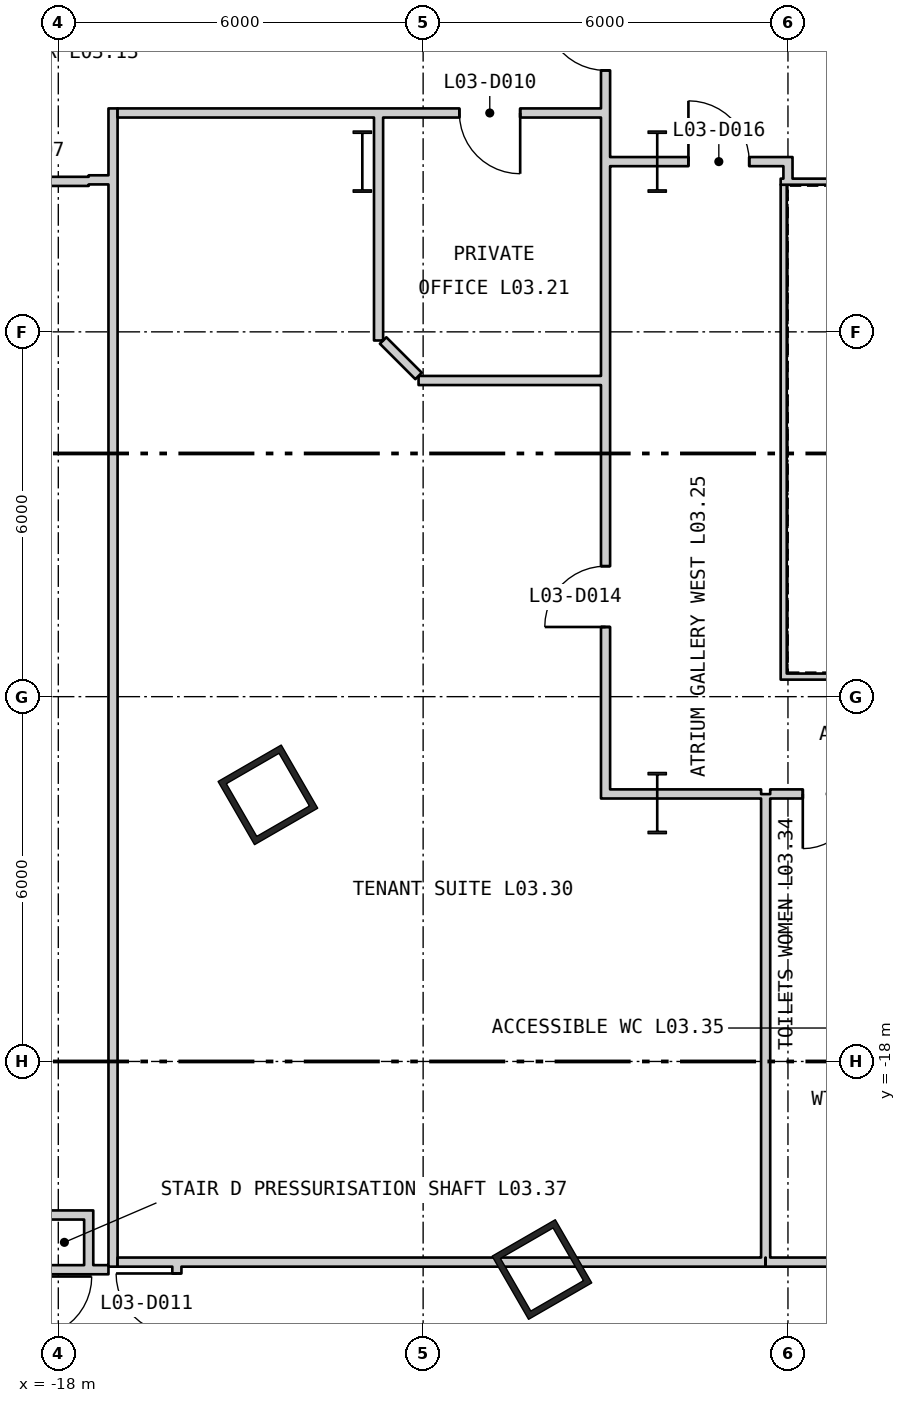
"""IFC4 building model, lengths in metres.
Left out: names, types, materials, properties, quantities, classifications, styles, units other than length and angle.
Written with IfcOpenShell. Run it as: python <this file> out.ifc"""

import sys

from ifc_helpers import new_model, si_unit, direction, frame, frame_2d, origin, origin_2d, place, context, subcontext, project, spatial, rectangle, hollow_rectangle, i_section, extrude, element, fill, save


model = new_model("IFC4")
c1 = context("Model", 3, precision=1e-05, world=origin(), true_north=direction((0.0, 1.0)))
c2 = subcontext(c1, "Body", "Model", "MODEL_VIEW")
j1 = project(units=[si_unit("LENGTHUNIT", "METRE"), si_unit("PLANEANGLEUNIT", "RADIAN")], contexts=[c1])
p1 = place(None, origin())
s1 = spatial("IfcSite", under=j1, at=p1, CompositionType="ELEMENT")
p2 = place(p1, origin())
s2 = spatial("IfcBuilding", under=s1, at=p2, CompositionType="ELEMENT")
p3 = place(p2, frame((0.0, 0.0, 18.6)))
s3 = spatial("IfcBuildingStorey", under=s2, at=p3, CompositionType="ELEMENT", Elevation=18.6)
for number, where, z_axis, x_axis in (
    (1, (-14.553, -13.615, 0.0), (0.0, 0.0, 1.0), (0.5, -0.866, 0.0)),
    (2, (-10.046, -21.422, 0.0), (0.0, 0.0, 1.0), (0.5, -0.866, 0.0)),
):
    element("IfcColumn", number, at=place(p3, frame(where, z_axis=z_axis, x_axis=x_axis)), inside=s3, PredefinedType="COLUMN", context=c2, shape_type="SweptSolid", body=[
        extrude(hollow_rectangle(XDim=1.2, YDim=1.2, WallThickness=0.1, at=origin_2d()), origin(), (0.0, 0.0, 1.0), 5.1),
    ])
for number, where, z_axis, x_axis in (
    (3, (-8.15, -3.2, 0.0), (0.0, 0.0, 1.0), (1.0, 0.0, 0.0)),
    (4, (-8.15, -13.75, 0.0), (0.0, 0.0, 1.0), (1.0, 0.0, 0.0)),
    (5, (-13.0, -3.2, 0.0), (0.0, 0.0, 1.0), (1.0, 0.0, 0.0)),
):
    element("IfcColumn", number, at=place(p3, frame(where, z_axis=z_axis, x_axis=x_axis)), inside=s3, PredefinedType="COLUMN", context=c2, shape_type="SweptSolid", body=[
        extrude(i_section(OverallWidth=0.302, OverallDepth=1.008, WebThickness=0.021, FlangeThickness=0.04, at=origin_2d()), origin(), (0.0, 0.0, 1.0), 5.1),
    ])
for number, where, z_axis, x_axis in (
    (6, (-6.12, -11.67, 0.0), (0.0, 0.0, 1.0), (1.0, 0.0, 0.0)),
    (7, (6.12, -3.53, 0.0), (0.0, 0.0, 1.0), (-1.0, 0.0, 0.0)),
):
    element("IfcWall", number, at=place(p3, frame(where, z_axis=z_axis, x_axis=x_axis)), inside=s3, PredefinedType="PARTITIONING", context=c2, shape_type="SweptSolid", body=[
        extrude(rectangle(XDim=12.24, YDim=0.1, at=frame_2d((6.12, 0.0))), origin(), (0.0, 0.0, 1.0), 4.88),
    ])
p4 = place(p3, frame((-6.07, -3.58, 0.0), z_axis=(0.0, 0.0, 1.0), x_axis=(0.0, -1.0, 0.0)))
e8 = element("IfcWall", 8, at=p4, inside=s3, PredefinedType="PARTITIONING", context=c2, shape_type="SweptSolid", body=[
    extrude(rectangle(XDim=8.04, YDim=0.1, at=frame_2d((4.02, 0.0))), origin(), (0.0, 0.0, 1.0), 4.88),
])
p5 = place(p3, frame((-19.825, -3.525, 0.0), z_axis=(0.0, 0.0, 1.0), x_axis=(1.0, 0.0, 0.0)))
e9 = element("IfcWall", 9, at=p5, inside=s3, PredefinedType="PARTITIONING", context=c2, shape_type="SweptSolid", body=[
    extrude(rectangle(XDim=2.325, YDim=0.15, at=frame_2d((1.163, 0.0))), origin(), (0.0, 0.0, 1.0), 4.88),
])
p6 = place(p5, frame((0.662, 0.0, 0.0)))
e10 = element("IfcOpeningElement", 10, at=p6, cuts=e9, PredefinedType="OPENING", context=c2, shape_type="SweptSolid", body=[
    extrude(rectangle(XDim=1.0, YDim=2.1, at=frame_2d((0.5, 1.05))), frame((0.0, 0.085, 0.0), z_axis=(0.0, -1.0, 0.0), x_axis=(1.0, 0.0, 0.0)), (0.0, 0.0, 1.0), 0.17),
])
for number, where, z_axis, x_axis in (
    (11, (-18.225, -21.425, 0.0), (0.0, 0.0, 1.0), (1.0, 0.0, 0.0)),
    (12, (-18.225, -20.525, 0.0), (0.0, 0.0, 1.0), (1.0, 0.0, 0.0)),
):
    element("IfcWall", number, at=place(p3, frame(where, z_axis=z_axis, x_axis=x_axis)), inside=s3, PredefinedType="PARTITIONING", context=c2, shape_type="SweptSolid", body=[
        extrude(rectangle(XDim=0.65, YDim=0.15, at=frame_2d((0.325, 0.0))), origin(), (0.0, 0.0, 1.0), 4.88),
    ])
p7 = place(p3, frame((-17.5, -21.5, 0.0), z_axis=(0.0, 0.0, 1.0), x_axis=(0.0, 1.0, 0.0)))
e13 = element("IfcWall", 13, at=p7, inside=s3, PredefinedType="PARTITIONING", context=c2, shape_type="SweptSolid", body=[
    extrude(rectangle(XDim=1.05, YDim=0.15, at=frame_2d((0.525, 0.0))), origin(), (0.0, 0.0, 1.0), 4.88),
])
p8 = place(p3, frame((-17.5, -3.5, 0.0), z_axis=(0.0, 0.0, 1.0), x_axis=(1.0, 0.0, 0.0)))
e14 = element("IfcWall", 14, at=p8, inside=s3, PredefinedType="PARTITIONING", context=c2, shape_type="SweptSolid", body=[
    extrude(rectangle(XDim=0.325, YDim=0.15, at=frame_2d((0.163, 0.0))), origin(), (0.0, 0.0, 1.0), 4.88),
])
p9 = place(p3, frame((-17.425, -21.425, 0.0), z_axis=(0.0, 0.0, 1.0), x_axis=(1.0, 0.0, 0.0)))
e15 = element("IfcWall", 15, at=p9, inside=s3, PredefinedType="PARTITIONING", context=c2, shape_type="SweptSolid", body=[
    extrude(rectangle(XDim=0.25, YDim=0.15, at=frame_2d((0.125, 0.0))), origin(), (0.0, 0.0, 1.0), 4.88),
])
p10 = place(p3, frame((-17.1, -21.375, 0.0), z_axis=(0.0, 0.0, 1.0), x_axis=(0.0, 1.0, 0.0)))
e16 = element("IfcWall", 16, at=p10, inside=s3, PredefinedType="PARTITIONING", context=c2, shape_type="SweptSolid", body=[
    extrude(rectangle(XDim=19.05, YDim=0.15, at=frame_2d((9.525, 0.0))), origin(), (0.0, 0.0, 1.0), 4.88),
])
p11 = place(p3, frame((-17.025, -21.3, 0.0), z_axis=(0.0, 0.0, 1.0), x_axis=(1.0, 0.0, 0.0)))
e17 = element("IfcWall", 17, at=p11, inside=s3, PredefinedType="PARTITIONING", context=c2, shape_type="SweptSolid", body=[
    extrude(rectangle(XDim=10.655, YDim=0.15, at=frame_2d((5.327, 0.0))), origin(), (0.0, 0.0, 1.0), 4.88),
])
p12 = place(p3, frame((-17.025, -2.4, 0.0), z_axis=(0.0, 0.0, 1.0), x_axis=(1.0, 0.0, 0.0)))
e18 = element("IfcWall", 18, at=p12, inside=s3, PredefinedType="PARTITIONING", context=c2, shape_type="SweptSolid", body=[
    extrude(rectangle(XDim=7.95, YDim=0.15, at=frame_2d((3.975, 0.0))), origin(), (0.0, 0.0, 1.0), 4.88),
])
p13 = place(p12, frame((5.621, 0.0, 0.0)))
e19 = element("IfcOpeningElement", 19, at=p13, cuts=e18, PredefinedType="OPENING", context=c2, shape_type="SweptSolid", body=[
    extrude(rectangle(XDim=1.0, YDim=2.1, at=frame_2d((0.5, 1.05))), frame((0.0, 0.085, 0.0), z_axis=(0.0, -1.0, 0.0), x_axis=(1.0, 0.0, 0.0)), (0.0, 0.0, 1.0), 0.17),
])
p14 = place(p3, frame((-16.05, -23.55, 0.0), z_axis=(0.0, 0.0, 1.0), x_axis=(0.0, 1.0, 0.0)))
e20 = element("IfcWall", 20, at=p14, inside=s3, PredefinedType="PARTITIONING", context=c2, shape_type="SweptSolid", body=[
    extrude(rectangle(XDim=2.175, YDim=0.15, at=frame_2d((1.087, 0.0))), origin(), (0.0, 0.0, 1.0), 4.88),
])
p15 = place(p14, frame((1.063, 0.0, 0.0)))
e21 = element("IfcOpeningElement", 21, at=p15, cuts=e20, PredefinedType="OPENING", context=c2, shape_type="SweptSolid", body=[
    extrude(rectangle(XDim=1.0, YDim=2.1, at=frame_2d((0.5, 1.05))), frame((0.0, 0.085, 0.0), z_axis=(0.0, -1.0, 0.0), x_axis=(1.0, 0.0, 0.0)), (0.0, 0.0, 1.0), 0.17),
])
p16 = place(p3, frame((-12.733, -6.142, 0.0), z_axis=(0.0, 0.0, 1.0), x_axis=(0.0, 1.0, 0.0)))
e22 = element("IfcWall", 22, at=p16, inside=s3, PredefinedType="PARTITIONING", context=c2, shape_type="SweptSolid", body=[
    extrude(rectangle(XDim=3.042, YDim=0.15, at=frame_2d((1.521, 0.0))), origin(), (0.0, 0.0, 1.0), 4.19),
])
p17 = place(p3, frame((-12.733, -3.1, 0.0), z_axis=(0.0, 0.0, 1.0), x_axis=(0.0, 1.0, 0.0)))
e23 = element("IfcWall", 23, at=p17, inside=s3, PredefinedType="PARTITIONING", context=c2, shape_type="SweptSolid", body=[
    extrude(rectangle(XDim=0.625, YDim=0.15, at=frame_2d((0.312, 0.0))), origin(), (0.0, 0.0, 1.0), 4.28),
])
p18 = place(p3, frame((-12.658, -6.142, 0.0), z_axis=(0.0, 0.0, 1.0), x_axis=(0.707106781187, -0.707106781187, 0.0)))
e24 = element("IfcWall", 24, at=p18, inside=s3, PredefinedType="PARTITIONING", context=c2, shape_type="SweptSolid", body=[
    extrude(rectangle(XDim=0.825, YDim=0.15, at=frame_2d((0.412, 0.0))), origin(), (0.0, 0.0, 1.0), 4.88),
])
p19 = place(p3, frame((-12.075, -6.8, 0.0), z_axis=(0.0, 0.0, 1.0), x_axis=(1.0, 0.0, 0.0)))
e25 = element("IfcWall", 25, at=p19, inside=s3, PredefinedType="PARTITIONING", context=c2, shape_type="SweptSolid", body=[
    extrude(rectangle(XDim=3.0, YDim=0.15, at=frame_2d((1.5, 0.0))), origin(), (0.0, 0.0, 1.0), 4.88),
])
p20 = place(p3, frame((-9.0, -13.675, 0.0), z_axis=(0.0, 0.0, 1.0), x_axis=(0.0, 1.0, 0.0)))
e26 = element("IfcWall", 26, at=p20, inside=s3, PredefinedType="PARTITIONING", context=c2, shape_type="SweptSolid", body=[
    extrude(rectangle(XDim=13.675, YDim=0.15, at=frame_2d((6.838, 0.0))), origin(), (0.0, 0.0, 1.0), 4.88),
])
p21 = place(p20, frame((2.821, 0.0, 0.0)))
e27 = element("IfcOpeningElement", 27, at=p21, cuts=e26, PredefinedType="OPENING", context=c2, shape_type="SweptSolid", body=[
    extrude(rectangle(XDim=1.0, YDim=2.1, at=frame_2d((0.5, 1.05))), frame((0.0, 0.085, 0.0), z_axis=(0.0, -1.0, 0.0), x_axis=(1.0, 0.0, 0.0)), (0.0, 0.0, 1.0), 0.17),
])
p22 = place(p20, frame((11.975, 0.0, 0.0)))
e28 = element("IfcOpeningElement", 28, at=p22, cuts=e26, PredefinedType="OPENING", context=c2, shape_type="SweptSolid", body=[
    extrude(rectangle(XDim=1.0, YDim=2.1, at=frame_2d((0.5, 1.05))), frame((0.0, 0.085, 0.0), z_axis=(0.0, -1.0, 0.0), x_axis=(1.0, 0.0, 0.0)), (0.0, 0.0, 1.0), 0.17),
])
p23 = place(p3, frame((-8.925, -13.6, 0.0), z_axis=(0.0, 0.0, 1.0), x_axis=(1.0, 0.0, 0.0)))
e29 = element("IfcWall", 29, at=p23, inside=s3, PredefinedType="PARTITIONING", context=c2, shape_type="SweptSolid", body=[
    extrude(rectangle(XDim=0.775, YDim=0.15, at=frame_2d((0.388, 0.0))), origin(), (0.0, 0.0, 1.0), 4.09),
])
p24 = place(p3, frame((-8.15, -13.6, 0.0), z_axis=(0.0, 0.0, 1.0), x_axis=(1.0, 0.0, 0.0)))
e30 = element("IfcWall", 30, at=p24, inside=s3, PredefinedType="PARTITIONING", context=c2, shape_type="SweptSolid", body=[
    extrude(rectangle(XDim=1.708, YDim=0.15, at=frame_2d((0.854, 0.0))), origin(), (0.0, 0.0, 1.0), 3.97),
])
p25 = place(p3, frame((-8.925, -3.2, 0.0), z_axis=(0.0, 0.0, 1.0), x_axis=(1.0, 0.0, 0.0)))
e31 = element("IfcWall", 31, at=p25, inside=s3, PredefinedType="PARTITIONING", context=c2, shape_type="SweptSolid", body=[
    extrude(rectangle(XDim=0.775, YDim=0.15, at=frame_2d((0.388, 0.0))), origin(), (0.0, 0.0, 1.0), 4.09),
])
p26 = place(p3, frame((-8.15, -3.2, 0.0), z_axis=(0.0, 0.0, 1.0), x_axis=(1.0, 0.0, 0.0)))
e32 = element("IfcWall", 32, at=p26, inside=s3, PredefinedType="PARTITIONING", context=c2, shape_type="SweptSolid", body=[
    extrude(rectangle(XDim=2.225, YDim=0.15, at=frame_2d((1.113, 0.0))), origin(), (0.0, 0.0, 1.0), 3.97),
])
p27 = place(p26, frame((0.513, 0.0, 0.0)))
e33 = element("IfcOpeningElement", 33, at=p27, cuts=e32, PredefinedType="OPENING", context=c2, shape_type="SweptSolid", body=[
    extrude(rectangle(XDim=1.0, YDim=2.1, at=frame_2d((0.5, 1.05))), frame((0.0, 0.085, 0.0), z_axis=(0.0, -1.0, 0.0), x_axis=(1.0, 0.0, 0.0)), (0.0, 0.0, 1.0), 0.17),
])
p28 = place(p3, frame((-6.367, -21.3, 0.0), z_axis=(0.0, 0.0, 1.0), x_axis=(1.0, 0.0, 0.0)))
e34 = element("IfcWall", 34, at=p28, inside=s3, PredefinedType="PARTITIONING", context=c2, shape_type="SweptSolid", body=[
    extrude(rectangle(XDim=4.667, YDim=0.15, at=frame_2d((2.333, 0.0))), origin(), (0.0, 0.0, 1.0), 4.88),
])
p29 = place(p3, frame((-6.367, -21.225, 0.0), z_axis=(0.0, 0.0, 1.0), x_axis=(0.0, 1.0, 0.0)))
e35 = element("IfcWall", 35, at=p29, inside=s3, PredefinedType="PARTITIONING", context=c2, shape_type="SweptSolid", body=[
    extrude(rectangle(XDim=7.622, YDim=0.15, at=frame_2d((3.811, 0.0))), origin(), (0.0, 0.0, 1.0), 4.28),
])
p30 = place(p3, frame((-6.292, -13.6, 0.0), z_axis=(0.0, 0.0, 1.0), x_axis=(1.0, 0.0, 0.0)))
e36 = element("IfcWall", 36, at=p30, inside=s3, PredefinedType="PARTITIONING", context=c2, shape_type="SweptSolid", body=[
    extrude(rectangle(XDim=4.592, YDim=0.15, at=frame_2d((2.296, 0.0))), origin(), (0.0, 0.0, 1.0), 3.97),
])
p31 = place(p30, frame((0.536, 0.0, 0.0)))
e37 = element("IfcOpeningElement", 37, at=p31, cuts=e36, PredefinedType="OPENING", context=c2, shape_type="SweptSolid", body=[
    extrude(rectangle(XDim=0.9, YDim=2.1, at=frame_2d((0.45, 1.05))), frame((0.0, 0.085, 0.0), z_axis=(0.0, -1.0, 0.0), x_axis=(1.0, 0.0, 0.0)), (0.0, 0.0, 1.0), 0.17),
])
p32 = place(p30, frame((1.854, 0.0, 0.0)))
e38 = element("IfcOpeningElement", 38, at=p32, cuts=e36, PredefinedType="OPENING", context=c2, shape_type="SweptSolid", body=[
    extrude(rectangle(XDim=0.9, YDim=2.1, at=frame_2d((0.45, 1.05))), frame((0.0, 0.085, 0.0), z_axis=(0.0, -1.0, 0.0), x_axis=(1.0, 0.0, 0.0)), (0.0, 0.0, 1.0), 0.17),
])
p33 = place(p30, frame((3.392, 0.0, 0.0)))
e39 = element("IfcOpeningElement", 39, at=p33, cuts=e36, PredefinedType="OPENING", context=c2, shape_type="SweptSolid", body=[
    extrude(rectangle(XDim=1.0, YDim=2.1, at=frame_2d((0.5, 1.05))), frame((0.0, 0.085, 0.0), z_axis=(0.0, -1.0, 0.0), x_axis=(1.0, 0.0, 0.0)), (0.0, 0.0, 1.0), 0.17),
])
p34 = place(p3, frame((-6.0, -3.48, 0.0), z_axis=(0.0, 0.0, 1.0), x_axis=(0.0, 1.0, 0.0)))
e40 = element("IfcWall", 40, at=p34, inside=s3, PredefinedType="PARTITIONING", context=c2, shape_type="SweptSolid", body=[
    extrude(rectangle(XDim=0.205, YDim=0.15, at=frame_2d((0.102, 0.0))), origin(), (0.0, 0.0, 1.0), 4.88),
])
p35 = place(p13, origin())
e41 = element("IfcDoor", 41, at=p35, inside=s3, OperationType="SINGLE_SWING_RIGHT", PredefinedType="DOOR", context=c2, shape_type="SweptSolid", body=[
    extrude(rectangle(XDim=1.0, YDim=2.1, at=frame_2d((0.5, 1.05))), frame((0.0, 0.025, 0.0), z_axis=(0.0, -1.0, 0.0), x_axis=(1.0, 0.0, 0.0)), (0.0, 0.0, 1.0), 0.05),
])
fill(e19, e41)
p36 = place(p15, origin())
e42 = element("IfcDoor", 42, at=p36, inside=s3, OperationType="SINGLE_SWING_LEFT", PredefinedType="DOOR", context=c2, shape_type="SweptSolid", body=[
    extrude(rectangle(XDim=1.0, YDim=2.1, at=frame_2d((0.5, 1.05))), frame((0.0, 0.025, 0.0), z_axis=(0.0, -1.0, 0.0), x_axis=(1.0, 0.0, 0.0)), (0.0, 0.0, 1.0), 0.05),
])
fill(e21, e42)
p37 = place(p21, origin())
e43 = element("IfcDoor", 43, at=p37, inside=s3, OperationType="SINGLE_SWING_RIGHT", PredefinedType="DOOR", context=c2, shape_type="SweptSolid", body=[
    extrude(rectangle(XDim=1.0, YDim=2.1, at=frame_2d((0.5, 1.05))), frame((0.0, 0.025, 0.0), z_axis=(0.0, -1.0, 0.0), x_axis=(1.0, 0.0, 0.0)), (0.0, 0.0, 1.0), 0.05),
])
fill(e27, e43)
p38 = place(p22, origin())
e44 = element("IfcDoor", 44, at=p38, inside=s3, OperationType="SINGLE_SWING_LEFT", PredefinedType="DOOR", context=c2, shape_type="SweptSolid", body=[
    extrude(rectangle(XDim=1.0, YDim=2.1, at=frame_2d((0.5, 1.05))), frame((0.0, 0.025, 0.0), z_axis=(0.0, -1.0, 0.0), x_axis=(1.0, 0.0, 0.0)), (0.0, 0.0, 1.0), 0.05),
])
fill(e28, e44)
p39 = place(p27, origin())
e45 = element("IfcDoor", 45, at=p39, inside=s3, OperationType="SINGLE_SWING_RIGHT", PredefinedType="DOOR", context=c2, shape_type="SweptSolid", body=[
    extrude(rectangle(XDim=1.0, YDim=2.1, at=frame_2d((0.5, 1.05))), frame((0.0, 0.025, 0.0), z_axis=(0.0, -1.0, 0.0), x_axis=(1.0, 0.0, 0.0)), (0.0, 0.0, 1.0), 0.05),
])
fill(e33, e45)
p40 = place(p31, origin())
e46 = element("IfcDoor", 46, at=p40, inside=s3, OperationType="SINGLE_SWING_LEFT", PredefinedType="DOOR", context=c2, shape_type="SweptSolid", body=[
    extrude(rectangle(XDim=0.9, YDim=2.1, at=frame_2d((0.45, 1.05))), frame((0.0, 0.025, 0.0), z_axis=(0.0, -1.0, 0.0), x_axis=(1.0, 0.0, 0.0)), (0.0, 0.0, 1.0), 0.05),
])
fill(e37, e46)
save(model, sys.argv[1])
